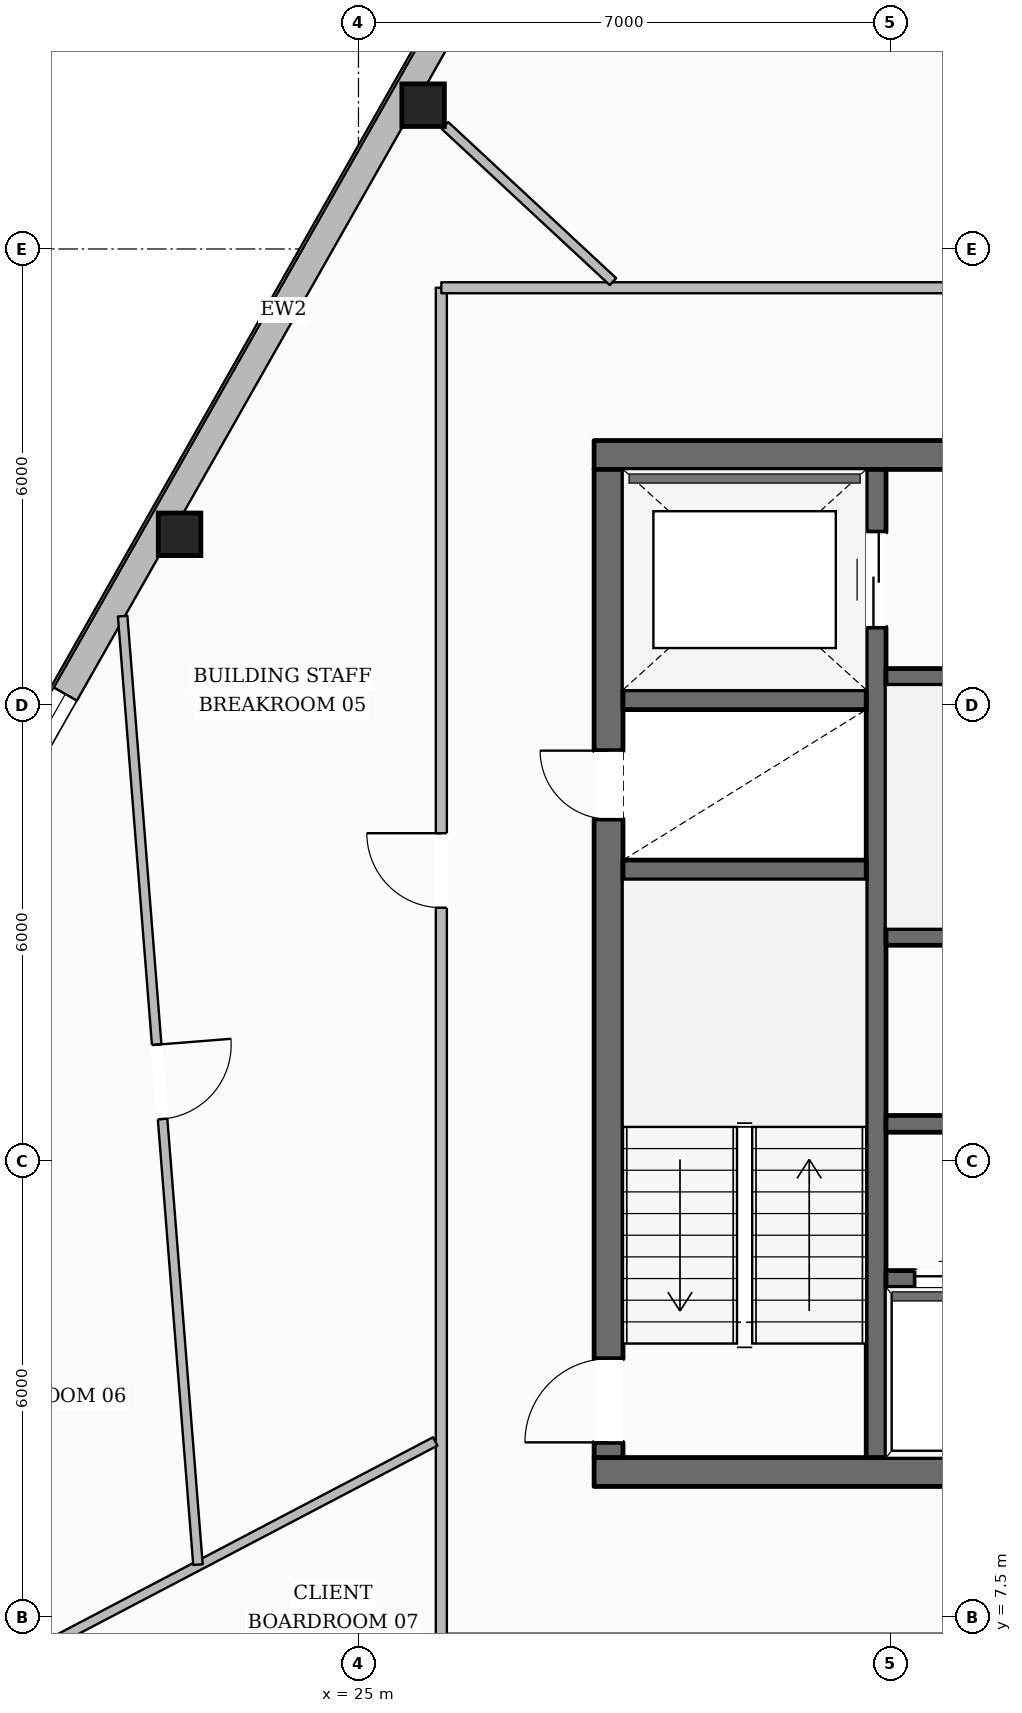
"""IFC4 building model, lengths in metres.
Left out: names, types, materials, properties, quantities, classifications, styles, units other than length and angle.
Written with IfcOpenShell. Run it as: python <this file> out.ifc"""

import sys

from ifc_helpers import new_model, si_unit, direction, frame, frame_2d, origin, origin_2d, place, context, subcontext, project, spatial, rectangle, hollow_rectangle, extrude, element, fill, save


model = new_model("IFC4")
c1 = context("Model", 3, precision=1e-05, world=origin(), true_north=direction((0.0, 1.0)))
c2 = subcontext(c1, "Body", "Model", "MODEL_VIEW")
j1 = project(units=[si_unit("LENGTHUNIT", "METRE"), si_unit("PLANEANGLEUNIT", "RADIAN")], contexts=[c1])
p1 = place(None, origin())
s1 = spatial("IfcSite", under=j1, at=p1, CompositionType="ELEMENT")
p2 = place(p1, origin())
s2 = spatial("IfcBuilding", under=s1, at=p2, CompositionType="ELEMENT")
p3 = place(p2, frame((0.0, 0.0, 301.1)))
s3 = spatial("IfcBuildingStorey", under=s2, at=p3, CompositionType="ELEMENT", Elevation=301.1)
p4 = place(p3, frame((28.1, 9.41, 0.0), z_axis=(0.0, 0.0, 1.0), x_axis=(1.0, 0.0, 0.0)))
e1 = element("IfcWall", 1, at=p4, inside=s3, PredefinedType="SOLIDWALL", context=c2, shape_type="SweptSolid", body=[
    extrude(rectangle(XDim=19.8, YDim=0.38, at=frame_2d((9.9, 0.0))), origin(), (0.0, 0.0, 1.0), 3.635),
])
p5 = place(p4, frame((10.4, 0.0, 0.0)))
e2 = element("IfcOpeningElement", 2, at=p5, cuts=e1, PredefinedType="OPENING", context=c2, shape_type="SweptSolid", body=[
    extrude(rectangle(XDim=1.4, YDim=2.2, at=frame_2d((0.7, 1.1))), frame((0.0, 0.2, 0.0), z_axis=(0.0, -1.0, 0.0), x_axis=(1.0, 0.0, 0.0)), (0.0, 0.0, 1.0), 0.4),
])
p6 = place(p3, frame((28.1, 22.79, 0.0), z_axis=(0.0, 0.0, 1.0), x_axis=(1.0, 0.0, 0.0)))
e3 = element("IfcWall", 3, at=p6, inside=s3, PredefinedType="SOLIDWALL", context=c2, shape_type="SweptSolid", body=[
    extrude(rectangle(XDim=19.8, YDim=0.38, at=frame_2d((9.9, 0.0))), origin(), (0.0, 0.0, 1.0), 3.635),
])
p7 = place(p6, frame((6.175, 0.0, 0.0)))
e4 = element("IfcOpeningElement", 4, at=p7, cuts=e3, PredefinedType="OPENING", context=c2, shape_type="SweptSolid", body=[
    extrude(rectangle(XDim=1.05, YDim=2.15, at=frame_2d((0.525, 1.075))), frame((0.0, 0.2, 0.0), z_axis=(0.0, -1.0, 0.0), x_axis=(1.0, 0.0, 0.0)), (0.0, 0.0, 1.0), 0.4),
])
p8 = place(p6, frame((12.575, 0.0, 0.0)))
e5 = element("IfcOpeningElement", 5, at=p8, cuts=e3, PredefinedType="OPENING", context=c2, shape_type="SweptSolid", body=[
    extrude(rectangle(XDim=1.05, YDim=2.15, at=frame_2d((0.525, 1.075))), frame((0.0, 0.2, 0.0), z_axis=(0.0, -1.0, 0.0), x_axis=(1.0, 0.0, 0.0)), (0.0, 0.0, 1.0), 0.4),
])
p9 = place(p3, frame((28.29, 9.6, 0.0), z_axis=(0.0, 0.0, 1.0), x_axis=(0.0, 1.0, 0.0)))
e6 = element("IfcWall", 6, at=p9, inside=s3, PredefinedType="SOLIDWALL", context=c2, shape_type="SweptSolid", body=[
    extrude(rectangle(XDim=13.0, YDim=0.38, at=frame_2d((6.5, 0.0))), origin(), (0.0, 0.0, 1.0), 3.635),
])
p10 = place(p9, frame((0.2, 0.0, 0.0)))
e7 = element("IfcOpeningElement", 7, at=p10, cuts=e6, PredefinedType="OPENING", context=c2, shape_type="SweptSolid", body=[
    extrude(rectangle(XDim=1.1, YDim=2.15, at=frame_2d((0.55, 1.075))), frame((0.0, 0.2, 0.0), z_axis=(0.0, -1.0, 0.0), x_axis=(1.0, 0.0, 0.0)), (0.0, 0.0, 1.0), 0.4),
])
p11 = place(p9, frame((8.4, 0.0, 0.0)))
e8 = element("IfcOpeningElement", 8, at=p11, cuts=e6, PredefinedType="OPENING", context=c2, shape_type="SweptSolid", body=[
    extrude(rectangle(XDim=0.9, YDim=2.1, at=frame_2d((0.45, 1.05))), frame((0.0, 0.2, 0.0), z_axis=(0.0, -1.0, 0.0), x_axis=(1.0, 0.0, 0.0)), (0.0, 0.0, 1.0), 0.4),
])
p12 = place(p3, frame((31.81, 9.6, 0.0), z_axis=(0.0, 0.0, 1.0), x_axis=(0.0, 1.0, 0.0)))
e9 = element("IfcWall", 9, at=p12, inside=s3, PredefinedType="SHEAR", context=c2, shape_type="SweptSolid", body=[
    extrude(rectangle(XDim=13.0, YDim=0.26, at=frame_2d((6.5, 0.0))), origin(), (0.0, 0.0, 1.0), 3.635),
])
p13 = place(p12, frame((10.925, 0.0, 0.0)))
e10 = element("IfcOpeningElement", 10, at=p13, cuts=e9, PredefinedType="OPENING", context=c2, shape_type="SweptSolid", body=[
    extrude(rectangle(XDim=1.25, YDim=2.25, at=frame_2d((0.625, 1.125))), frame((0.0, 0.14, 0.0), z_axis=(0.0, -1.0, 0.0), x_axis=(1.0, 0.0, 0.0)), (0.0, 0.0, 1.0), 0.28),
])
for number, where, z_axis, x_axis in (
    (11, (28.48, 17.33, 0.0), (0.0, 0.0, 1.0), (1.0, 0.0, 0.0)),
    (12, (28.48, 19.57, 0.0), (0.0, 0.0, 1.0), (1.0, 0.0, 0.0)),
):
    element("IfcWall", number, at=place(p3, frame(where, z_axis=z_axis, x_axis=x_axis)), inside=s3, PredefinedType="SHEAR", context=c2, shape_type="SweptSolid", body=[
        extrude(rectangle(XDim=3.2, YDim=0.26, at=frame_2d((1.6, 0.0))), origin(), (0.0, 0.0, 1.0), 3.635),
    ])
p14 = place(p3, frame((31.94, 19.87, 0.0), z_axis=(0.0, 0.0, 1.0), x_axis=(1.0, 0.0, 0.0)))
e13 = element("IfcWall", 13, at=p14, inside=s3, PredefinedType="SOLIDWALL", context=c2, shape_type="SweptSolid", body=[
    extrude(rectangle(XDim=12.12, YDim=0.22, at=frame_2d((6.06, 0.0))), origin(), (0.0, 0.0, 1.0), 3.635),
])
p15 = place(p14, frame((6.3, 0.0, 0.0)))
e14 = element("IfcOpeningElement", 14, at=p15, cuts=e13, PredefinedType="OPENING", context=c2, shape_type="SweptSolid", body=[
    extrude(rectangle(XDim=1.1, YDim=2.15, at=frame_2d((0.55, 1.075))), frame((0.0, 0.12, 0.0), z_axis=(0.0, -1.0, 0.0), x_axis=(1.0, 0.0, 0.0)), (0.0, 0.0, 1.0), 0.24),
])
p16 = place(p14, frame((8.01, 0.0, 0.0)))
e15 = element("IfcOpeningElement", 15, at=p16, cuts=e13, PredefinedType="OPENING", context=c2, shape_type="SweptSolid", body=[
    extrude(rectangle(XDim=0.9, YDim=2.1, at=frame_2d((0.45, 1.05))), frame((0.0, 0.12, 0.0), z_axis=(0.0, -1.0, 0.0), x_axis=(1.0, 0.0, 0.0)), (0.0, 0.0, 1.0), 0.24),
])
p17 = place(p14, frame((10.21, 0.0, 0.0)))
e16 = element("IfcOpeningElement", 16, at=p17, cuts=e13, PredefinedType="OPENING", context=c2, shape_type="SweptSolid", body=[
    extrude(rectangle(XDim=0.9, YDim=2.1, at=frame_2d((0.45, 1.05))), frame((0.0, 0.12, 0.0), z_axis=(0.0, -1.0, 0.0), x_axis=(1.0, 0.0, 0.0)), (0.0, 0.0, 1.0), 0.24),
])
p18 = place(p3, frame((31.94, 16.45, 0.0), z_axis=(0.0, 0.0, 1.0), x_axis=(1.0, 0.0, 0.0)))
e17 = element("IfcWall", 17, at=p18, inside=s3, PredefinedType="SOLIDWALL", context=c2, shape_type="SweptSolid", body=[
    extrude(rectangle(XDim=12.12, YDim=0.22, at=frame_2d((6.06, 0.0))), origin(), (0.0, 0.0, 1.0), 3.635),
])
p19 = place(p3, frame((31.94, 13.99, 0.0), z_axis=(0.0, 0.0, 1.0), x_axis=(1.0, 0.0, 0.0)))
e18 = element("IfcWall", 18, at=p19, inside=s3, PredefinedType="SOLIDWALL", context=c2, shape_type="SweptSolid", body=[
    extrude(rectangle(XDim=12.12, YDim=0.22, at=frame_2d((6.06, 0.0))), origin(), (0.0, 0.0, 1.0), 3.635),
])
p20 = place(p19, frame((1.11, 0.0, 0.0)))
e19 = element("IfcOpeningElement", 19, at=p20, cuts=e18, PredefinedType="OPENING", context=c2, shape_type="SweptSolid", body=[
    extrude(rectangle(XDim=0.9, YDim=2.1, at=frame_2d((0.45, 1.05))), frame((0.0, 0.12, 0.0), z_axis=(0.0, -1.0, 0.0), x_axis=(1.0, 0.0, 0.0)), (0.0, 0.0, 1.0), 0.24),
])
p21 = place(p19, frame((5.16, 0.0, 0.0)))
e20 = element("IfcOpeningElement", 20, at=p21, cuts=e18, PredefinedType="OPENING", context=c2, shape_type="SweptSolid", body=[
    extrude(rectangle(XDim=0.9, YDim=2.1, at=frame_2d((0.45, 1.05))), frame((0.0, 0.12, 0.0), z_axis=(0.0, -1.0, 0.0), x_axis=(1.0, 0.0, 0.0)), (0.0, 0.0, 1.0), 0.24),
])
p22 = place(p19, frame((9.61, 0.0, 0.0)))
e21 = element("IfcOpeningElement", 21, at=p22, cuts=e18, PredefinedType="OPENING", context=c2, shape_type="SweptSolid", body=[
    extrude(rectangle(XDim=0.9, YDim=2.1, at=frame_2d((0.45, 1.05))), frame((0.0, 0.12, 0.0), z_axis=(0.0, -1.0, 0.0), x_axis=(1.0, 0.0, 0.0)), (0.0, 0.0, 1.0), 0.24),
])
p23 = place(p3, frame((31.94, 11.95, 0.0), z_axis=(0.0, 0.0, 1.0), x_axis=(1.0, 0.0, 0.0)))
e22 = element("IfcWall", 22, at=p23, inside=s3, PredefinedType="SOLIDWALL", context=c2, shape_type="SweptSolid", body=[
    extrude(rectangle(XDim=6.19, YDim=0.22, at=frame_2d((3.095, 0.0))), origin(), (0.0, 0.0, 1.0), 3.635),
])
p24 = place(p23, frame((0.385, 0.0, 0.0)))
e23 = element("IfcOpeningElement", 23, at=p24, cuts=e22, PredefinedType="OPENING", context=c2, shape_type="SweptSolid", body=[
    extrude(rectangle(XDim=1.1, YDim=2.2, at=frame_2d((0.55, 1.1))), frame((0.0, 0.12, 0.0), z_axis=(0.0, -1.0, 0.0), x_axis=(1.0, 0.0, 0.0)), (0.0, 0.0, 1.0), 0.24),
])
p25 = place(p23, frame((2.435, 0.0, 0.0)))
e24 = element("IfcOpeningElement", 24, at=p25, cuts=e22, PredefinedType="OPENING", context=c2, shape_type="SweptSolid", body=[
    extrude(rectangle(XDim=1.1, YDim=2.2, at=frame_2d((0.55, 1.1))), frame((0.0, 0.12, 0.0), z_axis=(0.0, -1.0, 0.0), x_axis=(1.0, 0.0, 0.0)), (0.0, 0.0, 1.0), 0.24),
])
p26 = place(p23, frame((4.485, 0.0, 0.0)))
e25 = element("IfcOpeningElement", 25, at=p26, cuts=e22, PredefinedType="OPENING", context=c2, shape_type="SweptSolid", body=[
    extrude(rectangle(XDim=1.1, YDim=2.2, at=frame_2d((0.55, 1.1))), frame((0.0, 0.12, 0.0), z_axis=(0.0, -1.0, 0.0), x_axis=(1.0, 0.0, 0.0)), (0.0, 0.0, 1.0), 0.24),
])
for number, where, z_axis, x_axis in (
    (26, (25.85, 27.392, 0.0), (0.0, 0.0, 1.0), (1.0, 0.0, 0.0)),
    (27, (22.646, 21.746, 0.0), (0.0, 0.0, 1.0), (1.0, 0.0, 0.0)),
):
    element("IfcColumn", number, at=place(p3, frame(where, z_axis=z_axis, x_axis=x_axis)), inside=s3, PredefinedType="COLUMN", context=c2, shape_type="SweptSolid", body=[
        extrude(hollow_rectangle(XDim=0.56, YDim=0.56, WallThickness=0.025, at=origin_2d()), origin(), (0.0, 0.0, 1.0), 3.635),
    ])
p27 = place(p3, frame((15.771, 10.179, 0.0), z_axis=(0.0, 0.0, 1.0), x_axis=(0.493569993775, 0.869706077503, 0.0)))
e28 = element("IfcWall", 28, at=p27, inside=s3, PredefinedType="STANDARD", context=c2, shape_type="SweptSolid", body=[
    extrude(rectangle(XDim=39.897, YDim=0.35, at=frame_2d((19.949, 0.0))), origin(), (0.0, 0.0, 1.0), 3.221),
])
p28 = place(p27, frame((35.499, 0.0, 0.65)))
e29 = element("IfcOpeningElement", 29, at=p28, cuts=e28, PredefinedType="OPENING", context=c2, shape_type="SweptSolid", body=[
    extrude(rectangle(XDim=1.35, YDim=1.75, at=frame_2d((0.675, 0.875))), frame((0.0, 0.185, 0.0), z_axis=(0.0, -1.0, 0.0), x_axis=(1.0, 0.0, 0.0)), (0.0, 0.0, 1.0), 0.37),
])
p29 = place(p27, frame((29.007, 0.0, 0.65)))
e30 = element("IfcOpeningElement", 30, at=p29, cuts=e28, PredefinedType="OPENING", context=c2, shape_type="SweptSolid", body=[
    extrude(rectangle(XDim=1.35, YDim=1.75, at=frame_2d((0.675, 0.875))), frame((0.0, 0.185, 0.0), z_axis=(0.0, -1.0, 0.0), x_axis=(1.0, 0.0, 0.0)), (0.0, 0.0, 1.0), 0.37),
])
p30 = place(p27, frame((22.516, 0.0, 0.65)))
e31 = element("IfcOpeningElement", 31, at=p30, cuts=e28, PredefinedType="OPENING", context=c2, shape_type="SweptSolid", body=[
    extrude(rectangle(XDim=1.35, YDim=1.75, at=frame_2d((0.675, 0.875))), frame((0.0, 0.185, 0.0), z_axis=(0.0, -1.0, 0.0), x_axis=(1.0, 0.0, 0.0)), (0.0, 0.0, 1.0), 0.37),
])
p31 = place(p27, frame((9.533, 0.0, 0.65)))
e32 = element("IfcOpeningElement", 32, at=p31, cuts=e28, PredefinedType="OPENING", context=c2, shape_type="SweptSolid", body=[
    extrude(rectangle(XDim=1.35, YDim=1.75, at=frame_2d((0.675, 0.875))), frame((0.0, 0.185, 0.0), z_axis=(0.0, -1.0, 0.0), x_axis=(1.0, 0.0, 0.0)), (0.0, 0.0, 1.0), 0.37),
])
p32 = place(p27, frame((3.042, 0.0, 0.65)))
e33 = element("IfcOpeningElement", 33, at=p32, cuts=e28, PredefinedType="OPENING", context=c2, shape_type="SweptSolid", body=[
    extrude(rectangle(XDim=1.35, YDim=1.75, at=frame_2d((0.675, 0.875))), frame((0.0, 0.185, 0.0), z_axis=(0.0, -1.0, 0.0), x_axis=(1.0, 0.0, 0.0)), (0.0, 0.0, 1.0), 0.37),
])
p33 = place(p3, frame((26.09, 7.21, 0.0), z_axis=(0.0, 0.0, 1.0), x_axis=(0.0, 1.0, 0.0)))
e34 = element("IfcWall", 34, at=p33, inside=s3, PredefinedType="PARTITIONING", context=c2, shape_type="SweptSolid", body=[
    extrude(rectangle(XDim=17.78, YDim=0.145, at=frame_2d((8.89, 0.0))), origin(), (0.0, 0.0, 1.0), 3.374),
])
p34 = place(p33, frame((9.624, 0.0, 0.0)))
e35 = element("IfcOpeningElement", 35, at=p34, cuts=e34, PredefinedType="OPENING", context=c2, shape_type="SweptSolid", body=[
    extrude(rectangle(XDim=0.98, YDim=2.15, at=frame_2d((0.49, 1.075))), frame((0.0, 0.083, 0.0), z_axis=(0.0, -1.0, 0.0), x_axis=(1.0, 0.0, 0.0)), (0.0, 0.0, 1.0), 0.165),
])
p35 = place(p3, frame((26.09, 24.99, 0.0), z_axis=(0.0, 0.0, 1.0), x_axis=(1.0, 0.0, 0.0)))
e36 = element("IfcWall", 36, at=p35, inside=s3, PredefinedType="PARTITIONING", context=c2, shape_type="SweptSolid", body=[
    extrude(rectangle(XDim=17.11, YDim=0.145, at=frame_2d((8.555, 0.0))), origin(), (0.0, 0.0, 1.0), 3.635),
])
p36 = place(p35, frame((8.47, 0.0, 0.0)))
e37 = element("IfcOpeningElement", 37, at=p36, cuts=e36, PredefinedType="OPENING", context=c2, shape_type="SweptSolid", body=[
    extrude(rectangle(XDim=0.88, YDim=2.1, at=frame_2d((0.44, 1.05))), frame((0.0, 0.083, 0.0), z_axis=(0.0, -1.0, 0.0), x_axis=(1.0, 0.0, 0.0)), (0.0, 0.0, 1.0), 0.165),
])
p37 = place(p35, frame((10.99, 0.0, 0.0)))
e38 = element("IfcOpeningElement", 38, at=p37, cuts=e36, PredefinedType="OPENING", context=c2, shape_type="SweptSolid", body=[
    extrude(rectangle(XDim=0.88, YDim=2.1, at=frame_2d((0.44, 1.05))), frame((0.0, 0.083, 0.0), z_axis=(0.0, -1.0, 0.0), x_axis=(1.0, 0.0, 0.0)), (0.0, 0.0, 1.0), 0.165),
])
p38 = place(p35, frame((13.37, 0.0, 0.0)))
e39 = element("IfcOpeningElement", 39, at=p38, cuts=e36, PredefinedType="OPENING", context=c2, shape_type="SweptSolid", body=[
    extrude(rectangle(XDim=0.96, YDim=2.1, at=frame_2d((0.48, 1.05))), frame((0.0, 0.083, 0.0), z_axis=(0.0, -1.0, 0.0), x_axis=(1.0, 0.0, 0.0)), (0.0, 0.0, 1.0), 0.165),
])
p39 = place(p3, frame((28.348, 25.071, 0.0), z_axis=(0.0, 0.0, 1.0), x_axis=(-0.732493615347, 0.680773900407, 0.0)))
e40 = element("IfcWall", 40, at=p39, inside=s3, PredefinedType="PARTITIONING", context=c2, shape_type="SweptSolid", body=[
    extrude(rectangle(XDim=3.016, YDim=0.125, at=frame_2d((1.508, 0.0))), origin(), (0.0, 0.0, 1.0), 3.635),
])
p40 = place(p3, frame((26.01, 9.812, 0.0), z_axis=(0.0, 0.0, 1.0), x_axis=(-0.885601154602, -0.464446546944, 0.0)))
e41 = element("IfcWall", 41, at=p40, inside=s3, PredefinedType="PARTITIONING", context=c2, shape_type="SweptSolid", body=[
    extrude(rectangle(XDim=7.906, YDim=0.125, at=frame_2d((3.953, 0.0))), origin(), (0.0, 0.0, 1.0), 3.271),
])
p41 = place(p3, frame((21.897, 20.67, 0.0), z_axis=(0.0, 0.0, 1.0), x_axis=(0.07914521928, -0.996863097053, 0.0)))
e42 = element("IfcWall", 42, at=p41, inside=s3, PredefinedType="PARTITIONING", context=c2, shape_type="SweptSolid", body=[
    extrude(rectangle(XDim=12.518, YDim=0.125, at=frame_2d((6.259, 0.0))), origin(), (0.0, 0.0, 1.0), 3.374),
])
p42 = place(p41, frame((5.656, 0.0, 0.0)))
e43 = element("IfcOpeningElement", 43, at=p42, cuts=e42, PredefinedType="OPENING", context=c2, shape_type="SweptSolid", body=[
    extrude(rectangle(XDim=0.98, YDim=2.15, at=frame_2d((0.49, 1.075))), frame((0.0, 0.073, 0.0), z_axis=(0.0, -1.0, 0.0), x_axis=(1.0, 0.0, 0.0)), (0.0, 0.0, 1.0), 0.145),
])
p43 = place(p31, origin())
e44 = element("IfcWindow", 44, at=p43, inside=s3, PartitioningType="SINGLE_PANEL", PredefinedType="WINDOW", context=c2, shape_type="SweptSolid", body=[
    extrude(rectangle(XDim=1.35, YDim=1.75, at=frame_2d((0.675, 0.875))), frame((0.0, 0.03, 0.0), z_axis=(0.0, -1.0, 0.0), x_axis=(1.0, 0.0, 0.0)), (0.0, 0.0, 1.0), 0.06),
])
fill(e32, e44)
p44 = place(p10, origin())
e45 = element("IfcDoor", 45, at=p44, inside=s3, OperationType="SINGLE_SWING_LEFT", PredefinedType="DOOR", context=c2, shape_type="SweptSolid", body=[
    extrude(rectangle(XDim=1.1, YDim=2.15, at=frame_2d((0.55, 1.075))), frame((0.0, 0.025, 0.0), z_axis=(0.0, -1.0, 0.0), x_axis=(1.0, 0.0, 0.0)), (0.0, 0.0, 1.0), 0.05),
])
fill(e7, e45)
p45 = place(p11, origin())
e46 = element("IfcDoor", 46, at=p45, inside=s3, OperationType="SINGLE_SWING_RIGHT", PredefinedType="DOOR", context=c2, shape_type="SweptSolid", body=[
    extrude(rectangle(XDim=0.9, YDim=2.1, at=frame_2d((0.45, 1.05))), frame((0.0, 0.025, 0.0), z_axis=(0.0, -1.0, 0.0), x_axis=(1.0, 0.0, 0.0)), (0.0, 0.0, 1.0), 0.05),
])
fill(e8, e46)
p46 = place(p13, origin())
e47 = element("IfcDoor", 47, at=p46, inside=s3, OperationType="DOUBLE_DOOR_SLIDING", PredefinedType="DOOR", context=c2, shape_type="SweptSolid", body=[
    extrude(rectangle(XDim=1.25, YDim=2.25, at=frame_2d((0.625, 1.125))), frame((0.0, 0.025, 0.0), z_axis=(0.0, -1.0, 0.0), x_axis=(1.0, 0.0, 0.0)), (0.0, 0.0, 1.0), 0.05),
])
fill(e10, e47)
p47 = place(p24, origin())
e48 = element("IfcDoor", 48, at=p47, inside=s3, OperationType="DOUBLE_DOOR_SLIDING", PredefinedType="DOOR", context=c2, shape_type="SweptSolid", body=[
    extrude(rectangle(XDim=1.1, YDim=2.2, at=frame_2d((0.55, 1.1))), frame((0.0, 0.025, 0.0), z_axis=(0.0, -1.0, 0.0), x_axis=(1.0, 0.0, 0.0)), (0.0, 0.0, 1.0), 0.05),
])
fill(e23, e48)
p48 = place(p34, origin())
e49 = element("IfcDoor", 49, at=p48, inside=s3, OperationType="SINGLE_SWING_RIGHT", PredefinedType="DOOR", context=c2, shape_type="SweptSolid", body=[
    extrude(rectangle(XDim=0.98, YDim=2.15, at=frame_2d((0.49, 1.075))), frame((0.0, 0.025, 0.0), z_axis=(0.0, -1.0, 0.0), x_axis=(1.0, 0.0, 0.0)), (0.0, 0.0, 1.0), 0.05),
])
fill(e35, e49)
p49 = place(p42, origin())
e50 = element("IfcDoor", 50, at=p49, inside=s3, OperationType="SINGLE_SWING_LEFT", PredefinedType="DOOR", context=c2, shape_type="SweptSolid", body=[
    extrude(rectangle(XDim=0.98, YDim=2.15, at=frame_2d((0.49, 1.075))), frame((0.0, 0.025, 0.0), z_axis=(0.0, -1.0, 0.0), x_axis=(1.0, 0.0, 0.0)), (0.0, 0.0, 1.0), 0.05),
])
fill(e43, e50)
save(model, sys.argv[1])
